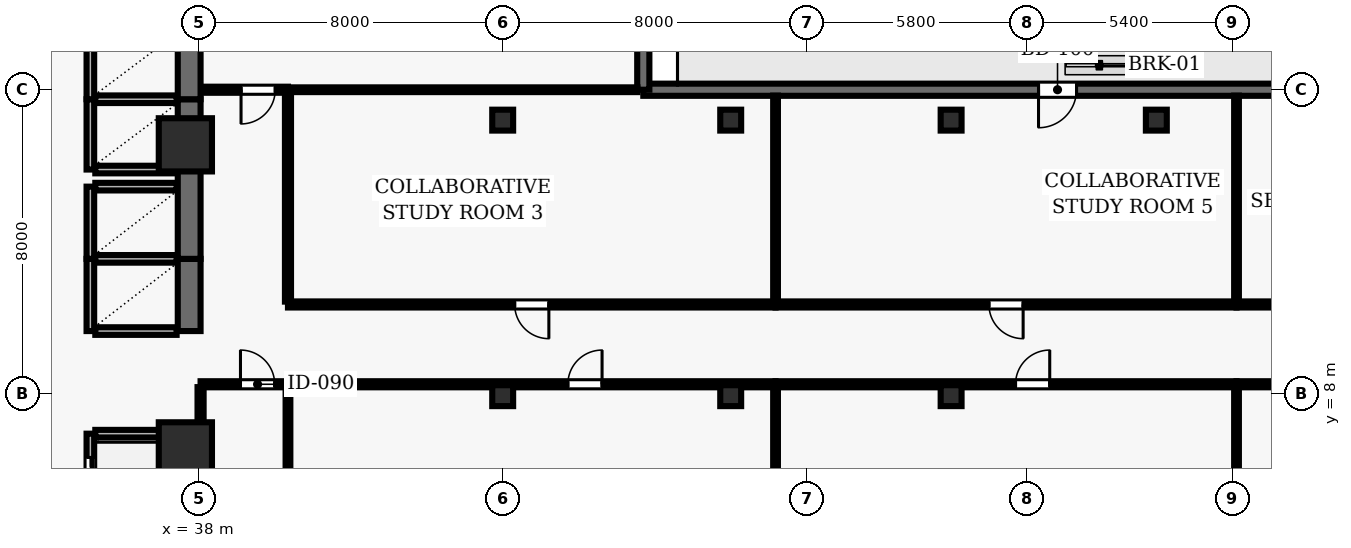
"""IFC4 building model, lengths in metres.
Left out: names, types, materials, properties, quantities, classifications, styles, units other than length and angle.
Written with IfcOpenShell. Run it as: python <this file> out.ifc"""

import sys

from ifc_helpers import new_model, si_unit, direction, frame, frame_2d, origin, origin_2d, place, context, subcontext, project, spatial, rectangle, hollow_rectangle, extrude, element, fill, save


model = new_model("IFC4")
c1 = context("Model", 3, precision=1e-05, world=origin(), true_north=direction((0.0, 1.0)))
c2 = subcontext(c1, "Body", "Model", "MODEL_VIEW")
j1 = project(units=[si_unit("LENGTHUNIT", "METRE"), si_unit("PLANEANGLEUNIT", "RADIAN")], contexts=[c1])
p1 = place(None, origin())
s1 = spatial("IfcSite", under=j1, at=p1, CompositionType="ELEMENT")
p2 = place(p1, origin())
s2 = spatial("IfcBuilding", under=s1, at=p2, CompositionType="ELEMENT")
p3 = place(p2, frame((0.0, 0.0, 73.9)))
s3 = spatial("IfcBuildingStorey", under=s2, at=p3, CompositionType="ELEMENT", Elevation=73.9)
for number, where, z_axis, x_axis in (
    (1, (37.65, 6.55, 0.0), (0.0, 0.0, 1.0), (1.0, 0.0, 0.0)),
    (2, (37.65, 14.55, 0.0), (0.0, 0.0, 1.0), (1.0, 0.0, 0.0)),
):
    element("IfcColumn", number, at=place(p3, frame(where, z_axis=z_axis, x_axis=x_axis)), inside=s3, PredefinedType="COLUMN", context=c2, shape_type="SweptSolid", body=[
        extrude(rectangle(XDim=1.4, YDim=1.4, at=origin_2d()), origin(), (0.0, 0.0, 1.0), 3.9),
    ])
for number, where, z_axis, x_axis in (
    (3, (46.0, 7.95, 0.0), (0.0, 0.0, 1.0), (1.0, 0.0, 0.0)),
    (4, (46.0, 15.2, 0.0), (0.0, 0.0, 1.0), (1.0, 0.0, 0.0)),
    (5, (52.0, 7.95, 0.0), (0.0, 0.0, 1.0), (1.0, 0.0, 0.0)),
    (6, (52.0, 15.2, 0.0), (0.0, 0.0, 1.0), (1.0, 0.0, 0.0)),
    (7, (57.8, 7.95, 0.0), (0.0, 0.0, 1.0), (1.0, 0.0, 0.0)),
    (8, (57.8, 15.2, 0.0), (0.0, 0.0, 1.0), (1.0, 0.0, 0.0)),
    (9, (63.2, 15.2, 0.0), (0.0, 0.0, 1.0), (1.0, 0.0, 0.0)),
):
    element("IfcColumn", number, at=place(p3, frame(where, z_axis=z_axis, x_axis=x_axis)), inside=s3, PredefinedType="COLUMN", context=c2, shape_type="SweptSolid", body=[
        extrude(hollow_rectangle(XDim=0.55, YDim=0.55, WallThickness=0.025, at=origin_2d()), origin(), (0.0, 0.0, 1.0), 3.9),
    ])
p4 = place(p3, frame((73.5, 16.0, 0.0), z_axis=(0.0, 0.0, 1.0), x_axis=(-1.0, 0.0, 0.0)))
e10 = element("IfcWall", 10, at=p4, inside=s3, PredefinedType="SOLIDWALL", context=c2, shape_type="SweptSolid", body=[
    extrude(rectangle(XDim=23.8, YDim=0.32, at=frame_2d((11.9, 0.0))), origin(), (0.0, 0.0, 1.0), 3.69),
])
p5 = place(p4, frame((12.4, 0.0, 0.0)))
e11 = element("IfcOpeningElement", 11, at=p5, cuts=e10, PredefinedType="OPENING", context=c2, shape_type="SweptSolid", body=[
    extrude(rectangle(XDim=1.0, YDim=2.2, at=frame_2d((0.5, 1.1))), frame((0.0, 0.17, 0.0), z_axis=(0.0, -1.0, 0.0), x_axis=(1.0, 0.0, 0.0)), (0.0, 0.0, 1.0), 0.34),
])
p6 = place(p4, frame((2.075, 0.0, 0.9)))
e12 = element("IfcOpeningElement", 12, at=p6, cuts=e10, PredefinedType="OPENING", context=c2, shape_type="SweptSolid", body=[
    extrude(rectangle(XDim=1.8, YDim=2.2, at=frame_2d((0.9, 1.1))), frame((0.0, 0.17, 0.0), z_axis=(0.0, -1.0, 0.0), x_axis=(1.0, 0.0, 0.0)), (0.0, 0.0, 1.0), 0.34),
])
p7 = place(p3, frame((49.7, 16.0, 0.0), z_axis=(0.0, 0.0, 1.0), x_axis=(0.0, 1.0, 0.0)))
e13 = element("IfcWall", 13, at=p7, inside=s3, PredefinedType="SOLIDWALL", context=c2, shape_type="SweptSolid", body=[
    extrude(rectangle(XDim=8.79, YDim=0.32, at=frame_2d((4.395, 0.0))), origin(), (0.0, 0.0, 1.0), 3.69),
])
p8 = place(p7, frame((3.195, 0.0, 0.9)))
e14 = element("IfcOpeningElement", 14, at=p8, cuts=e13, PredefinedType="OPENING", context=c2, shape_type="SweptSolid", body=[
    extrude(rectangle(XDim=2.4, YDim=2.2, at=frame_2d((1.2, 1.1))), frame((0.0, 0.17, 0.0), z_axis=(0.0, -1.0, 0.0), x_axis=(1.0, 0.0, 0.0)), (0.0, 0.0, 1.0), 0.34),
])
p9 = place(p3, frame((35.15, 6.95, 0.0), z_axis=(0.0, 0.0, 1.0), x_axis=(0.0, -1.0, 0.0)))
e15 = element("IfcWall", 15, at=p9, inside=s3, PredefinedType="SOLIDWALL", context=c2, shape_type="SweptSolid", body=[
    extrude(rectangle(XDim=2.25, YDim=0.2, at=frame_2d((1.125, 0.0))), origin(), (0.0, 0.0, 1.0), 3.69),
])
p10 = place(p9, frame((0.625, 0.0, 0.0)))
e16 = element("IfcOpeningElement", 16, at=p10, cuts=e15, PredefinedType="OPENING", context=c2, shape_type="SweptSolid", body=[
    extrude(rectangle(XDim=1.0, YDim=2.1, at=frame_2d((0.5, 1.05))), frame((0.0, 0.11, 0.0), z_axis=(0.0, -1.0, 0.0), x_axis=(1.0, 0.0, 0.0)), (0.0, 0.0, 1.0), 0.22),
])
p11 = place(p3, frame((37.75, 4.7, 0.0), z_axis=(0.0, 0.0, 1.0), x_axis=(0.0, 1.0, 0.0)))
e17 = element("IfcWall", 17, at=p11, inside=s3, PredefinedType="SHEAR", context=c2, shape_type="SweptSolid", body=[
    extrude(rectangle(XDim=2.25, YDim=0.6, at=frame_2d((1.125, 0.0))), origin(), (0.0, 0.0, 1.0), 3.69),
])
p12 = place(p3, frame((37.42, 6.95, 0.0), z_axis=(0.0, 0.0, 1.0), x_axis=(-1.0, 0.0, 0.0)))
e18 = element("IfcWall", 18, at=p12, inside=s3, PredefinedType="SOLIDWALL", context=c2, shape_type="SweptSolid", body=[
    extrude(rectangle(XDim=2.14, YDim=0.2, at=frame_2d((1.07, 0.0))), origin(), (0.0, 0.0, 1.0), 3.69),
])
p13 = place(p3, frame((35.15, 11.55, 0.0), z_axis=(0.0, 0.0, 1.0), x_axis=(0.0, -1.0, 0.0)))
e19 = element("IfcWall", 19, at=p13, inside=s3, PredefinedType="SOLIDWALL", context=c2, shape_type="SweptSolid", body=[
    extrude(rectangle(XDim=1.9, YDim=0.2, at=frame_2d((0.95, 0.0))), origin(), (0.0, 0.0, 1.0), 3.69),
])
p14 = place(p3, frame((37.75, 9.65, 0.0), z_axis=(0.0, 0.0, 1.0), x_axis=(0.0, 1.0, 0.0)))
e20 = element("IfcWall", 20, at=p14, inside=s3, PredefinedType="SHEAR", context=c2, shape_type="SweptSolid", body=[
    extrude(rectangle(XDim=1.9, YDim=0.6, at=frame_2d((0.95, 0.0))), origin(), (0.0, 0.0, 1.0), 3.69),
])
for number, where, z_axis, x_axis in (
    (21, (35.28, 9.65, 0.0), (0.0, 0.0, 1.0), (1.0, 0.0, 0.0)),
    (22, (37.42, 11.55, 0.0), (0.0, 0.0, 1.0), (-1.0, 0.0, 0.0)),
):
    element("IfcWall", number, at=place(p3, frame(where, z_axis=z_axis, x_axis=x_axis)), inside=s3, PredefinedType="SOLIDWALL", context=c2, shape_type="SweptSolid", body=[
        extrude(rectangle(XDim=2.14, YDim=0.2, at=frame_2d((1.07, 0.0))), origin(), (0.0, 0.0, 1.0), 3.69),
    ])
p15 = place(p3, frame((35.15, 13.45, 0.0), z_axis=(0.0, 0.0, 1.0), x_axis=(0.0, -1.0, 0.0)))
e23 = element("IfcWall", 23, at=p15, inside=s3, PredefinedType="SOLIDWALL", context=c2, shape_type="SweptSolid", body=[
    extrude(rectangle(XDim=1.9, YDim=0.2, at=frame_2d((0.95, 0.0))), origin(), (0.0, 0.0, 1.0), 3.69),
])
p16 = place(p3, frame((37.75, 11.55, 0.0), z_axis=(0.0, 0.0, 1.0), x_axis=(0.0, 1.0, 0.0)))
e24 = element("IfcWall", 24, at=p16, inside=s3, PredefinedType="SHEAR", context=c2, shape_type="SweptSolid", body=[
    extrude(rectangle(XDim=2.35, YDim=0.6, at=frame_2d((1.175, 0.0))), origin(), (0.0, 0.0, 1.0), 3.69),
])
p17 = place(p3, frame((37.42, 13.45, 0.0), z_axis=(0.0, 0.0, 1.0), x_axis=(-1.0, 0.0, 0.0)))
e25 = element("IfcWall", 25, at=p17, inside=s3, PredefinedType="SOLIDWALL", context=c2, shape_type="SweptSolid", body=[
    extrude(rectangle(XDim=2.14, YDim=0.2, at=frame_2d((1.07, 0.0))), origin(), (0.0, 0.0, 1.0), 3.69),
])
p18 = place(p3, frame((35.15, 15.75, 0.0), z_axis=(0.0, 0.0, 1.0), x_axis=(0.0, -1.0, 0.0)))
e26 = element("IfcWall", 26, at=p18, inside=s3, PredefinedType="SOLIDWALL", context=c2, shape_type="SweptSolid", body=[
    extrude(rectangle(XDim=1.85, YDim=0.2, at=frame_2d((0.925, 0.0))), origin(), (0.0, 0.0, 1.0), 3.69),
])
p19 = place(p3, frame((37.75, 13.9, 0.0), z_axis=(0.0, 0.0, 1.0), x_axis=(0.0, 1.0, 0.0)))
e27 = element("IfcWall", 27, at=p19, inside=s3, PredefinedType="SHEAR", context=c2, shape_type="SweptSolid", body=[
    extrude(rectangle(XDim=1.85, YDim=0.6, at=frame_2d((0.925, 0.0))), origin(), (0.0, 0.0, 1.0), 3.69),
])
for number, where, z_axis, x_axis in (
    (28, (35.28, 13.9, 0.0), (0.0, 0.0, 1.0), (1.0, 0.0, 0.0)),
    (29, (37.42, 15.75, 0.0), (0.0, 0.0, 1.0), (-1.0, 0.0, 0.0)),
):
    element("IfcWall", number, at=place(p3, frame(where, z_axis=z_axis, x_axis=x_axis)), inside=s3, PredefinedType="SOLIDWALL", context=c2, shape_type="SweptSolid", body=[
        extrude(rectangle(XDim=2.14, YDim=0.2, at=frame_2d((1.07, 0.0))), origin(), (0.0, 0.0, 1.0), 3.69),
    ])
p20 = place(p3, frame((35.15, 17.6, 0.0), z_axis=(0.0, 0.0, 1.0), x_axis=(0.0, -1.0, 0.0)))
e30 = element("IfcWall", 30, at=p20, inside=s3, PredefinedType="SOLIDWALL", context=c2, shape_type="SweptSolid", body=[
    extrude(rectangle(XDim=1.85, YDim=0.2, at=frame_2d((0.925, 0.0))), origin(), (0.0, 0.0, 1.0), 3.69),
])
p21 = place(p3, frame((37.75, 15.75, 0.0), z_axis=(0.0, 0.0, 1.0), x_axis=(0.0, 1.0, 0.0)))
e31 = element("IfcWall", 31, at=p21, inside=s3, PredefinedType="SHEAR", context=c2, shape_type="SweptSolid", body=[
    extrude(rectangle(XDim=1.85, YDim=0.6, at=frame_2d((0.925, 0.0))), origin(), (0.0, 0.0, 1.0), 3.69),
])
p22 = place(p3, frame((38.05, 8.25, 0.0), z_axis=(0.0, 0.0, 1.0), x_axis=(1.0, 0.0, 0.0)))
e32 = element("IfcWall", 32, at=p22, inside=s3, PredefinedType="PARTITIONING", context=c2, shape_type="SweptSolid", body=[
    extrude(rectangle(XDim=2.3, YDim=0.16, at=frame_2d((1.15, 0.0))), origin(), (0.0, 0.0, 1.0), 3.055),
])
p23 = place(p22, frame((1.05, 0.0, 0.0)))
e33 = element("IfcOpeningElement", 33, at=p23, cuts=e32, PredefinedType="OPENING", context=c2, shape_type="SweptSolid", body=[
    extrude(rectangle(XDim=0.9, YDim=2.1, at=frame_2d((0.45, 1.05))), frame((0.0, 0.09, 0.0), z_axis=(0.0, -1.0, 0.0), x_axis=(1.0, 0.0, 0.0)), (0.0, 0.0, 1.0), 0.18),
])
p24 = place(p3, frame((40.35, 8.25, 0.0), z_axis=(0.0, 0.0, 1.0), x_axis=(1.0, 0.0, 0.0)))
e34 = element("IfcWall", 34, at=p24, inside=s3, PredefinedType="PARTITIONING", context=c2, shape_type="SweptSolid", body=[
    extrude(rectangle(XDim=12.83, YDim=0.16, at=frame_2d((6.415, 0.0))), origin(), (0.0, 0.0, 1.0), 3.055),
])
p25 = place(p24, frame((7.365, 0.0, 0.0)))
e35 = element("IfcOpeningElement", 35, at=p25, cuts=e34, PredefinedType="OPENING", context=c2, shape_type="SweptSolid", body=[
    extrude(rectangle(XDim=0.9, YDim=2.1, at=frame_2d((0.45, 1.05))), frame((0.0, 0.09, 0.0), z_axis=(0.0, -1.0, 0.0), x_axis=(1.0, 0.0, 0.0)), (0.0, 0.0, 1.0), 0.18),
])
p26 = place(p3, frame((40.35, 16.0, 0.0), z_axis=(0.0, 0.0, 1.0), x_axis=(1.0, 0.0, 0.0)))
e36 = element("IfcWall", 36, at=p26, inside=s3, PredefinedType="PARTITIONING", context=c2, shape_type="SweptSolid", body=[
    extrude(rectangle(XDim=9.195, YDim=0.125, at=frame_2d((4.597, 0.0))), origin(), (0.0, 0.0, 1.0), 3.39),
])
p27 = place(p3, frame((40.35, 16.0, 0.0), z_axis=(0.0, 0.0, 1.0), x_axis=(-1.0, 0.0, 0.0)))
e37 = element("IfcWall", 37, at=p27, inside=s3, PredefinedType="PARTITIONING", context=c2, shape_type="SweptSolid", body=[
    extrude(rectangle(XDim=2.27, YDim=0.16, at=frame_2d((1.135, 0.0))), origin(), (0.0, 0.0, 1.0), 3.69),
])
p28 = place(p27, frame((0.335, 0.0, 0.0)))
e38 = element("IfcOpeningElement", 38, at=p28, cuts=e37, PredefinedType="OPENING", context=c2, shape_type="SweptSolid", body=[
    extrude(rectangle(XDim=0.9, YDim=2.1, at=frame_2d((0.45, 1.05))), frame((0.0, 0.09, 0.0), z_axis=(0.0, -1.0, 0.0), x_axis=(1.0, 0.0, 0.0)), (0.0, 0.0, 1.0), 0.18),
])
p29 = place(p3, frame((53.18, 8.25, 0.0), z_axis=(0.0, 0.0, 1.0), x_axis=(1.0, 0.0, 0.0)))
e39 = element("IfcWall", 39, at=p29, inside=s3, PredefinedType="PARTITIONING", context=c2, shape_type="SweptSolid", body=[
    extrude(rectangle(XDim=12.13, YDim=0.16, at=frame_2d((6.065, 0.0))), origin(), (0.0, 0.0, 1.0), 3.055),
])
p30 = place(p29, frame((6.315, 0.0, 0.0)))
e40 = element("IfcOpeningElement", 40, at=p30, cuts=e39, PredefinedType="OPENING", context=c2, shape_type="SweptSolid", body=[
    extrude(rectangle(XDim=0.9, YDim=2.1, at=frame_2d((0.45, 1.05))), frame((0.0, 0.09, 0.0), z_axis=(0.0, -1.0, 0.0), x_axis=(1.0, 0.0, 0.0)), (0.0, 0.0, 1.0), 0.18),
])
p31 = place(p3, frame((53.18, 10.35, 0.0), z_axis=(0.0, 0.0, 1.0), x_axis=(-1.0, 0.0, 0.0)))
e41 = element("IfcWall", 41, at=p31, inside=s3, PredefinedType="PARTITIONING", context=c2, shape_type="SweptSolid", body=[
    extrude(rectangle(XDim=12.83, YDim=0.16, at=frame_2d((6.415, 0.0))), origin(), (0.0, 0.0, 1.0), 3.277),
])
p32 = place(p31, frame((5.965, 0.0, 0.0)))
e42 = element("IfcOpeningElement", 42, at=p32, cuts=e41, PredefinedType="OPENING", context=c2, shape_type="SweptSolid", body=[
    extrude(rectangle(XDim=0.9, YDim=2.1, at=frame_2d((0.45, 1.05))), frame((0.0, 0.09, 0.0), z_axis=(0.0, -1.0, 0.0), x_axis=(1.0, 0.0, 0.0)), (0.0, 0.0, 1.0), 0.18),
])
p33 = place(p3, frame((65.31, 8.25, 0.0), z_axis=(0.0, 0.0, 1.0), x_axis=(1.0, 0.0, 0.0)))
e43 = element("IfcWall", 43, at=p33, inside=s3, PredefinedType="PARTITIONING", context=c2, shape_type="SweptSolid", body=[
    extrude(rectangle(XDim=10.535, YDim=0.16, at=frame_2d((5.268, 0.0))), origin(), (0.0, 0.0, 1.0), 3.69),
])
p34 = place(p33, frame((4.767, 0.0, 0.0)))
e44 = element("IfcOpeningElement", 44, at=p34, cuts=e43, PredefinedType="OPENING", context=c2, shape_type="SweptSolid", body=[
    extrude(rectangle(XDim=1.0, YDim=2.1, at=frame_2d((0.5, 1.05))), frame((0.0, 0.09, 0.0), z_axis=(0.0, -1.0, 0.0), x_axis=(1.0, 0.0, 0.0)), (0.0, 0.0, 1.0), 0.18),
])
p35 = place(p3, frame((65.31, 10.35, 0.0), z_axis=(0.0, 0.0, 1.0), x_axis=(-1.0, 0.0, 0.0)))
e45 = element("IfcWall", 45, at=p35, inside=s3, PredefinedType="PARTITIONING", context=c2, shape_type="SweptSolid", body=[
    extrude(rectangle(XDim=12.13, YDim=0.16, at=frame_2d((6.065, 0.0))), origin(), (0.0, 0.0, 1.0), 3.277),
])
p36 = place(p35, frame((5.615, 0.0, 0.0)))
e46 = element("IfcOpeningElement", 46, at=p36, cuts=e45, PredefinedType="OPENING", context=c2, shape_type="SweptSolid", body=[
    extrude(rectangle(XDim=0.9, YDim=2.1, at=frame_2d((0.45, 1.05))), frame((0.0, 0.09, 0.0), z_axis=(0.0, -1.0, 0.0), x_axis=(1.0, 0.0, 0.0)), (0.0, 0.0, 1.0), 0.18),
])
p37 = place(p3, frame((75.845, 10.35, 0.0), z_axis=(0.0, 0.0, 1.0), x_axis=(-1.0, 0.0, 0.0)))
e47 = element("IfcWall", 47, at=p37, inside=s3, PredefinedType="PARTITIONING", context=c2, shape_type="SweptSolid", body=[
    extrude(rectangle(XDim=10.535, YDim=0.16, at=frame_2d((5.268, 0.0))), origin(), (0.0, 0.0, 1.0), 3.277),
])
p38 = place(p37, frame((4.817, 0.0, 0.0)))
e48 = element("IfcOpeningElement", 48, at=p38, cuts=e47, PredefinedType="OPENING", context=c2, shape_type="SweptSolid", body=[
    extrude(rectangle(XDim=0.9, YDim=2.1, at=frame_2d((0.45, 1.05))), frame((0.0, 0.09, 0.0), z_axis=(0.0, -1.0, 0.0), x_axis=(1.0, 0.0, 0.0)), (0.0, 0.0, 1.0), 0.18),
])
p39 = place(p3, frame((38.05, 7.05, 0.0), z_axis=(0.0, 0.0, 1.0), x_axis=(0.0, 1.0, 0.0)))
e49 = element("IfcWall", 49, at=p39, inside=s3, PredefinedType="PARTITIONING", context=c2, shape_type="SweptSolid", body=[
    extrude(rectangle(XDim=1.125, YDim=0.16, at=frame_2d((0.562, 0.0))), origin(), (0.0, 0.0, 1.0), 3.055),
])
p40 = place(p3, frame((40.35, 0.155, 0.0), z_axis=(0.0, 0.0, 1.0), x_axis=(0.0, 1.0, 0.0)))
e50 = element("IfcWall", 50, at=p40, inside=s3, PredefinedType="PARTITIONING", context=c2, shape_type="SweptSolid", body=[
    extrude(rectangle(XDim=8.02, YDim=0.125, at=frame_2d((4.01, 0.0))), origin(), (0.0, 0.0, 1.0), 3.69),
])
p41 = place(p3, frame((40.35, 10.425, 0.0), z_axis=(0.0, 0.0, 1.0), x_axis=(0.0, 1.0, 0.0)))
e51 = element("IfcWall", 51, at=p41, inside=s3, PredefinedType="PARTITIONING", context=c2, shape_type="SweptSolid", body=[
    extrude(rectangle(XDim=5.5, YDim=0.16, at=frame_2d((2.75, 0.0))), origin(), (0.0, 0.0, 1.0), 3.277),
])
p42 = place(p3, frame((53.18, 0.155, 0.0), z_axis=(0.0, 0.0, 1.0), x_axis=(0.0, 1.0, 0.0)))
e52 = element("IfcWall", 52, at=p42, inside=s3, PredefinedType="PARTITIONING", context=c2, shape_type="SweptSolid", body=[
    extrude(rectangle(XDim=8.02, YDim=0.125, at=frame_2d((4.01, 0.0))), origin(), (0.0, 0.0, 1.0), 3.69),
])
p43 = place(p3, frame((53.18, 10.425, 0.0), z_axis=(0.0, 0.0, 1.0), x_axis=(0.0, 1.0, 0.0)))
e53 = element("IfcWall", 53, at=p43, inside=s3, PredefinedType="PARTITIONING", context=c2, shape_type="SweptSolid", body=[
    extrude(rectangle(XDim=5.42, YDim=0.125, at=frame_2d((2.71, 0.0))), origin(), (0.0, 0.0, 1.0), 3.69),
])
p44 = place(p3, frame((65.31, 0.155, 0.0), z_axis=(0.0, 0.0, 1.0), x_axis=(0.0, 1.0, 0.0)))
e54 = element("IfcWall", 54, at=p44, inside=s3, PredefinedType="PARTITIONING", context=c2, shape_type="SweptSolid", body=[
    extrude(rectangle(XDim=8.02, YDim=0.125, at=frame_2d((4.01, 0.0))), origin(), (0.0, 0.0, 1.0), 3.69),
])
p45 = place(p3, frame((65.31, 10.425, 0.0), z_axis=(0.0, 0.0, 1.0), x_axis=(0.0, 1.0, 0.0)))
e55 = element("IfcWall", 55, at=p45, inside=s3, PredefinedType="PARTITIONING", context=c2, shape_type="SweptSolid", body=[
    extrude(rectangle(XDim=5.42, YDim=0.125, at=frame_2d((2.71, 0.0))), origin(), (0.0, 0.0, 1.0), 3.69),
])
p46 = place(p5, origin())
e56 = element("IfcDoor", 56, at=p46, inside=s3, OperationType="SINGLE_SWING_RIGHT", PredefinedType="DOOR", context=c2, shape_type="SweptSolid", body=[
    extrude(rectangle(XDim=1.0, YDim=2.2, at=frame_2d((0.5, 1.1))), frame((0.0, 0.025, 0.0), z_axis=(0.0, -1.0, 0.0), x_axis=(1.0, 0.0, 0.0)), (0.0, 0.0, 1.0), 0.05),
])
fill(e11, e56)
p47 = place(p10, origin())
e57 = element("IfcDoor", 57, at=p47, inside=s3, OperationType="DOUBLE_DOOR_SLIDING", PredefinedType="DOOR", context=c2, shape_type="SweptSolid", body=[
    extrude(rectangle(XDim=1.0, YDim=2.1, at=frame_2d((0.5, 1.05))), frame((0.0, 0.025, 0.0), z_axis=(0.0, -1.0, 0.0), x_axis=(1.0, 0.0, 0.0)), (0.0, 0.0, 1.0), 0.05),
])
fill(e16, e57)
p48 = place(p23, origin())
e58 = element("IfcDoor", 58, at=p48, inside=s3, OperationType="SINGLE_SWING_LEFT", PredefinedType="DOOR", context=c2, shape_type="SweptSolid", body=[
    extrude(rectangle(XDim=0.9, YDim=2.1, at=frame_2d((0.45, 1.05))), frame((0.0, 0.025, 0.0), z_axis=(0.0, -1.0, 0.0), x_axis=(1.0, 0.0, 0.0)), (0.0, 0.0, 1.0), 0.05),
])
fill(e33, e58)
p49 = place(p25, origin())
e59 = element("IfcDoor", 59, at=p49, inside=s3, OperationType="SINGLE_SWING_RIGHT", PredefinedType="DOOR", context=c2, shape_type="SweptSolid", body=[
    extrude(rectangle(XDim=0.9, YDim=2.1, at=frame_2d((0.45, 1.05))), frame((0.0, 0.025, 0.0), z_axis=(0.0, -1.0, 0.0), x_axis=(1.0, 0.0, 0.0)), (0.0, 0.0, 1.0), 0.05),
])
fill(e35, e59)
p50 = place(p32, origin())
e60 = element("IfcDoor", 60, at=p50, inside=s3, OperationType="SINGLE_SWING_LEFT", PredefinedType="DOOR", context=c2, shape_type="SweptSolid", body=[
    extrude(rectangle(XDim=0.9, YDim=2.1, at=frame_2d((0.45, 1.05))), frame((0.0, 0.025, 0.0), z_axis=(0.0, -1.0, 0.0), x_axis=(1.0, 0.0, 0.0)), (0.0, 0.0, 1.0), 0.05),
])
fill(e42, e60)
p51 = place(p30, origin())
e61 = element("IfcDoor", 61, at=p51, inside=s3, OperationType="SINGLE_SWING_RIGHT", PredefinedType="DOOR", context=c2, shape_type="SweptSolid", body=[
    extrude(rectangle(XDim=0.9, YDim=2.1, at=frame_2d((0.45, 1.05))), frame((0.0, 0.025, 0.0), z_axis=(0.0, -1.0, 0.0), x_axis=(1.0, 0.0, 0.0)), (0.0, 0.0, 1.0), 0.05),
])
fill(e40, e61)
p52 = place(p36, origin())
e62 = element("IfcDoor", 62, at=p52, inside=s3, OperationType="SINGLE_SWING_LEFT", PredefinedType="DOOR", context=c2, shape_type="SweptSolid", body=[
    extrude(rectangle(XDim=0.9, YDim=2.1, at=frame_2d((0.45, 1.05))), frame((0.0, 0.025, 0.0), z_axis=(0.0, -1.0, 0.0), x_axis=(1.0, 0.0, 0.0)), (0.0, 0.0, 1.0), 0.05),
])
fill(e46, e62)
p53 = place(p28, origin())
e63 = element("IfcDoor", 63, at=p53, inside=s3, OperationType="SINGLE_SWING_RIGHT", PredefinedType="DOOR", context=c2, shape_type="SweptSolid", body=[
    extrude(rectangle(XDim=0.9, YDim=2.1, at=frame_2d((0.45, 1.05))), frame((0.0, 0.025, 0.0), z_axis=(0.0, -1.0, 0.0), x_axis=(1.0, 0.0, 0.0)), (0.0, 0.0, 1.0), 0.05),
])
fill(e38, e63)
save(model, sys.argv[1])
